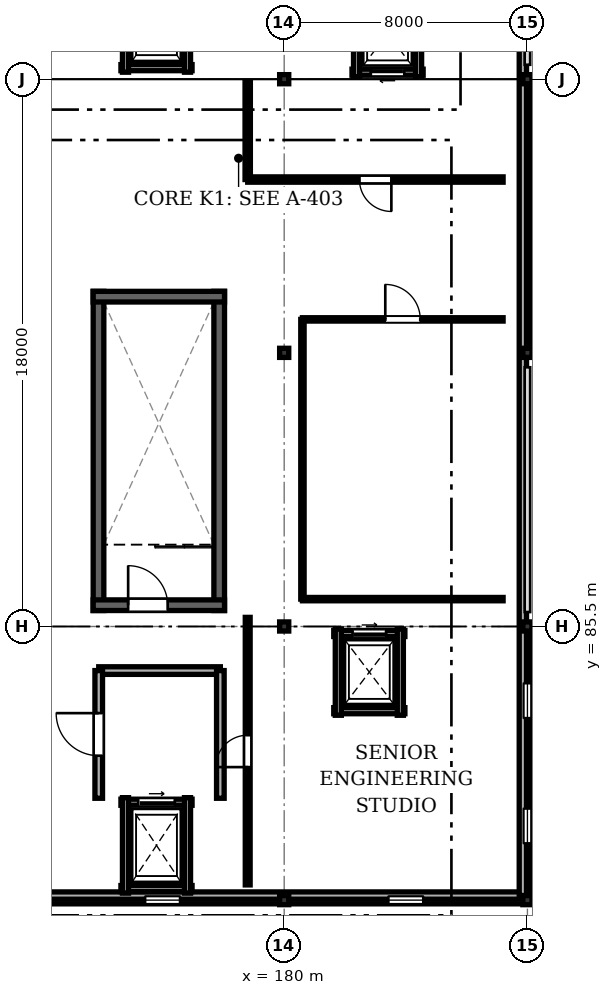
"""IFC4 building model, lengths in metres.
Left out: names, types, materials, properties, quantities, classifications, styles, units other than length and angle.
Written with IfcOpenShell. Run it as: python <this file> out.ifc"""

import sys

from ifc_helpers import new_model, si_unit, direction, frame, frame_2d, origin, origin_2d, place, context, subcontext, project, spatial, rectangle, i_section, extrude, element, fill, save


model = new_model("IFC4")
c1 = context("Model", 3, precision=1e-05, world=origin(), true_north=direction((0.0, 1.0)))
c2 = subcontext(c1, "Body", "Model", "MODEL_VIEW")
j1 = project(units=[si_unit("LENGTHUNIT", "METRE"), si_unit("PLANEANGLEUNIT", "RADIAN")], contexts=[c1])
p1 = place(None, origin())
s1 = spatial("IfcSite", under=j1, at=p1, CompositionType="ELEMENT")
p2 = place(p1, origin())
s2 = spatial("IfcBuilding", under=s1, at=p2, CompositionType="ELEMENT")
p3 = place(p2, frame((0.0, 0.0, 20.8)))
s3 = spatial("IfcBuildingStorey", under=s2, at=p3, CompositionType="ELEMENT", Elevation=20.8)
for number, where, z_axis, x_axis in (
    (1, (180.0, 76.5, 0.0), (0.0, 0.0, 1.0), (1.0, 0.0, 0.0)),
    (2, (180.0, 85.5, 0.0), (0.0, 0.0, 1.0), (1.0, 0.0, 0.0)),
    (3, (180.0, 94.5, 0.0), (0.0, 0.0, 1.0), (1.0, 0.0, 0.0)),
    (4, (180.0, 103.5, 0.0), (0.0, 0.0, 1.0), (1.0, 0.0, 0.0)),
    (5, (188.0, 76.5, 0.0), (0.0, 0.0, 1.0), (1.0, 0.0, 0.0)),
    (6, (188.0, 85.5, 0.0), (0.0, 0.0, 1.0), (1.0, 0.0, 0.0)),
    (7, (188.0, 94.5, 0.0), (0.0, 0.0, 1.0), (1.0, 0.0, 0.0)),
    (8, (188.0, 103.5, 0.0), (0.0, 0.0, 1.0), (1.0, 0.0, 0.0)),
):
    element("IfcColumn", number, at=place(p3, frame(where, z_axis=z_axis, x_axis=x_axis)), inside=s3, PredefinedType="COLUMN", context=c2, shape_type="SweptSolid", body=[
        extrude(i_section(OverallWidth=0.3, OverallDepth=0.3, WebThickness=0.01, FlangeThickness=0.015, FilletRadius=0.018, at=origin_2d()), origin(), (0.0, 0.0, 1.0), 2.85),
    ])
p4 = place(p3, frame((187.995, 76.5, 0.0), z_axis=(0.0, 0.0, 1.0), x_axis=(-1.0, 0.0, 0.0)))
e9 = element("IfcWall", 9, at=p4, inside=s3, PredefinedType="SOLIDWALL", context=c2, shape_type="SweptSolid", body=[
    extrude(rectangle(XDim=7.99, YDim=0.245, at=frame_2d((3.995, 0.0))), origin(), (0.0, 0.0, 1.0), 2.23),
])
p5 = place(p4, frame((3.42, 0.0, 0.7)))
e10 = element("IfcOpeningElement", 10, at=p5, cuts=e9, PredefinedType="OPENING", context=c2, shape_type="SweptSolid", body=[
    extrude(rectangle(XDim=1.15, YDim=1.45, at=frame_2d((0.575, 0.725))), frame((0.0, 0.133, 0.0), z_axis=(0.0, -1.0, 0.0), x_axis=(1.0, 0.0, 0.0)), (0.0, 0.0, 1.0), 0.265),
])
p6 = place(p3, frame((179.995, 76.5, 0.0), z_axis=(0.0, 0.0, 1.0), x_axis=(-1.0, 0.0, 0.0)))
e11 = element("IfcWall", 11, at=p6, inside=s3, PredefinedType="SOLIDWALL", context=c2, shape_type="SweptSolid", body=[
    extrude(rectangle(XDim=7.99, YDim=0.245, at=frame_2d((3.995, 0.0))), origin(), (0.0, 0.0, 1.0), 2.23),
])
p7 = place(p6, frame((3.42, 0.0, 0.7)))
e12 = element("IfcOpeningElement", 12, at=p7, cuts=e11, PredefinedType="OPENING", context=c2, shape_type="SweptSolid", body=[
    extrude(rectangle(XDim=1.15, YDim=1.45, at=frame_2d((0.575, 0.725))), frame((0.0, 0.133, 0.0), z_axis=(0.0, -1.0, 0.0), x_axis=(1.0, 0.0, 0.0)), (0.0, 0.0, 1.0), 0.265),
])
p8 = place(p3, frame((188.0, 85.35, 0.0), z_axis=(0.0, 0.0, 1.0), x_axis=(0.0, -1.0, 0.0)))
e13 = element("IfcWall", 13, at=p8, inside=s3, PredefinedType="SOLIDWALL", context=c2, shape_type="SweptSolid", body=[
    extrude(rectangle(XDim=8.7, YDim=0.245, at=frame_2d((4.35, 0.0))), origin(), (0.0, 0.0, 1.0), 2.23),
])
p9 = place(p8, frame((1.715, 0.0, 0.7)))
e14 = element("IfcOpeningElement", 14, at=p9, cuts=e13, PredefinedType="OPENING", context=c2, shape_type="SweptSolid", body=[
    extrude(rectangle(XDim=1.15, YDim=1.45, at=frame_2d((0.575, 0.725))), frame((0.0, 0.133, 0.0), z_axis=(0.0, -1.0, 0.0), x_axis=(1.0, 0.0, 0.0)), (0.0, 0.0, 1.0), 0.265),
])
p10 = place(p8, frame((5.835, 0.0, 0.7)))
e15 = element("IfcOpeningElement", 15, at=p10, cuts=e13, PredefinedType="OPENING", context=c2, shape_type="SweptSolid", body=[
    extrude(rectangle(XDim=1.15, YDim=1.45, at=frame_2d((0.575, 0.725))), frame((0.0, 0.133, 0.0), z_axis=(0.0, -1.0, 0.0), x_axis=(1.0, 0.0, 0.0)), (0.0, 0.0, 1.0), 0.265),
])
p11 = place(p3, frame((188.0, 103.35, 0.0), z_axis=(0.0, 0.0, 1.0), x_axis=(0.0, -1.0, 0.0)))
e16 = element("IfcWall", 16, at=p11, inside=s3, PredefinedType="SOLIDWALL", context=c2, shape_type="SweptSolid", body=[
    extrude(rectangle(XDim=8.7, YDim=0.245, at=frame_2d((4.35, 0.0))), origin(), (0.0, 0.0, 1.0), 2.18),
])
p12 = place(p3, frame((163.15, 76.65, 2.85), z_axis=(0.0, 0.0, 1.0), x_axis=(1.0, 0.0, 0.0)))
e17 = element("IfcWall", 17, at=p12, inside=s3, PredefinedType="PARAPET", context=c2, shape_type="SweptSolid", body=[
    extrude(rectangle(XDim=24.7, YDim=0.24, at=frame_2d((12.35, 0.0))), origin(), (0.0, 0.0, 1.0), 0.34),
])
p13 = place(p3, frame((187.85, 76.65, 2.85), z_axis=(0.0, 0.0, 1.0), x_axis=(0.0, 1.0, 0.0)))
e18 = element("IfcWall", 18, at=p13, inside=s3, PredefinedType="PARAPET", context=c2, shape_type="SweptSolid", body=[
    extrude(rectangle(XDim=49.2, YDim=0.24, at=frame_2d((24.6, 0.0))), origin(), (0.0, 0.0, 1.0), 0.34),
])
for number, where, z_axis, x_axis in (
    (19, (177.863, 86.025, 0.0), (0.0, 0.0, 1.0), (0.0, 1.0, 0.0)),
    (20, (173.893, 96.522, 0.0), (0.0, 0.0, 1.0), (0.0, -1.0, 0.0)),
):
    element("IfcWall", number, at=place(p3, frame(where, z_axis=z_axis, x_axis=x_axis)), inside=s3, PredefinedType="SHEAR", context=c2, shape_type="SweptSolid", body=[
        extrude(rectangle(XDim=10.498, YDim=0.35, at=frame_2d((5.249, 0.0))), origin(), (0.0, 0.0, 1.0), 2.645),
    ])
p14 = place(p3, frame((178.038, 96.347, 0.0), z_axis=(0.0, 0.0, 1.0), x_axis=(-1.0, 0.0, 0.0)))
e21 = element("IfcWall", 21, at=p14, inside=s3, PredefinedType="SHEAR", context=c2, shape_type="SweptSolid", body=[
    extrude(rectangle(XDim=4.32, YDim=0.35, at=frame_2d((2.16, 0.0))), origin(), (0.0, 0.0, 1.0), 2.645),
])
p15 = place(p3, frame((173.718, 86.2, 0.0), z_axis=(0.0, 0.0, 1.0), x_axis=(1.0, 0.0, 0.0)))
e22 = element("IfcWall", 22, at=p15, inside=s3, PredefinedType="SHEAR", context=c2, shape_type="SweptSolid", body=[
    extrude(rectangle(XDim=4.32, YDim=0.35, at=frame_2d((2.16, 0.0))), origin(), (0.0, 0.0, 1.0), 2.645),
])
p16 = place(p15, frame((1.15, 0.0, 0.0)))
e23 = element("IfcOpeningElement", 23, at=p16, cuts=e22, PredefinedType="OPENING", context=c2, shape_type="SweptSolid", body=[
    extrude(rectangle(XDim=1.3, YDim=2.1, at=frame_2d((0.65, 1.05))), frame((0.0, 0.185, 0.0), z_axis=(0.0, -1.0, 0.0), x_axis=(1.0, 0.0, 0.0)), (0.0, 0.0, 1.0), 0.37),
])
p17 = place(p3, frame((174.63, 76.88, 0.0), z_axis=(0.0, 0.0, 1.0), x_axis=(1.0, 0.0, 0.0)))
e24 = element("IfcWall", 24, at=p17, inside=s3, PredefinedType="SOLIDWALL", context=c2, shape_type="SweptSolid", body=[
    extrude(rectangle(XDim=2.34, YDim=0.2, at=frame_2d((1.17, 0.0))), origin(), (0.0, 0.0, 1.0), 2.23),
])
p18 = place(p3, frame((176.97, 79.72, 0.0), z_axis=(0.0, 0.0, 1.0), x_axis=(-1.0, 0.0, 0.0)))
e25 = element("IfcWall", 25, at=p18, inside=s3, PredefinedType="SOLIDWALL", context=c2, shape_type="SweptSolid", body=[
    extrude(rectangle(XDim=2.34, YDim=0.2, at=frame_2d((1.17, 0.0))), origin(), (0.0, 0.0, 1.0), 2.62),
])
p19 = place(p18, frame((0.57, 0.0, 0.0)))
e26 = element("IfcOpeningElement", 26, at=p19, cuts=e25, PredefinedType="OPENING", context=c2, shape_type="SweptSolid", body=[
    extrude(rectangle(XDim=1.2, YDim=2.15, at=frame_2d((0.6, 1.075))), frame((0.0, 0.11, 0.0), z_axis=(0.0, -1.0, 0.0), x_axis=(1.0, 0.0, 0.0)), (0.0, 0.0, 1.0), 0.22),
])
for number, where, z_axis, x_axis in (
    (27, (174.78, 79.87, 0.0), (0.0, 0.0, 1.0), (0.0, -1.0, 0.0)),
    (28, (176.82, 76.73, 0.0), (0.0, 0.0, 1.0), (0.0, 1.0, 0.0)),
):
    element("IfcWall", number, at=place(p3, frame(where, z_axis=z_axis, x_axis=x_axis)), inside=s3, PredefinedType="SOLIDWALL", context=c2, shape_type="SweptSolid", body=[
        extrude(rectangle(XDim=3.14, YDim=0.2, at=frame_2d((1.57, 0.0))), origin(), (0.0, 0.0, 1.0), 2.23),
    ])
p20 = place(p3, frame((174.63, 103.88, 0.0), z_axis=(0.0, 0.0, 1.0), x_axis=(1.0, 0.0, 0.0)))
e29 = element("IfcWall", 29, at=p20, inside=s3, PredefinedType="SOLIDWALL", context=c2, shape_type="SweptSolid", body=[
    extrude(rectangle(XDim=2.34, YDim=0.2, at=frame_2d((1.17, 0.0))), origin(), (0.0, 0.0, 1.0), 2.23),
])
for number, where, z_axis, x_axis in (
    (30, (174.78, 106.87, 0.0), (0.0, 0.0, 1.0), (0.0, -1.0, 0.0)),
    (31, (176.82, 103.73, 0.0), (0.0, 0.0, 1.0), (0.0, 1.0, 0.0)),
):
    element("IfcWall", number, at=place(p3, frame(where, z_axis=z_axis, x_axis=x_axis)), inside=s3, PredefinedType="SOLIDWALL", context=c2, shape_type="SweptSolid", body=[
        extrude(rectangle(XDim=3.14, YDim=0.2, at=frame_2d((1.57, 0.0))), origin(), (0.0, 0.0, 1.0), 2.23),
    ])
p21 = place(p3, frame((181.63, 82.73, 0.0), z_axis=(0.0, 0.0, 1.0), x_axis=(1.0, 0.0, 0.0)))
e32 = element("IfcWall", 32, at=p21, inside=s3, PredefinedType="SOLIDWALL", context=c2, shape_type="SweptSolid", body=[
    extrude(rectangle(XDim=2.34, YDim=0.2, at=frame_2d((1.17, 0.0))), origin(), (0.0, 0.0, 1.0), 2.62),
])
p22 = place(p3, frame((183.97, 85.27, 0.0), z_axis=(0.0, 0.0, 1.0), x_axis=(-1.0, 0.0, 0.0)))
e33 = element("IfcWall", 33, at=p22, inside=s3, PredefinedType="SOLIDWALL", context=c2, shape_type="SweptSolid", body=[
    extrude(rectangle(XDim=2.34, YDim=0.2, at=frame_2d((1.17, 0.0))), origin(), (0.0, 0.0, 1.0), 2.23),
])
p23 = place(p22, frame((0.62, 0.0, 0.0)))
e34 = element("IfcOpeningElement", 34, at=p23, cuts=e33, PredefinedType="OPENING", context=c2, shape_type="SweptSolid", body=[
    extrude(rectangle(XDim=1.1, YDim=2.15, at=frame_2d((0.55, 1.075))), frame((0.0, 0.11, 0.0), z_axis=(0.0, -1.0, 0.0), x_axis=(1.0, 0.0, 0.0)), (0.0, 0.0, 1.0), 0.22),
])
for number, where, z_axis, x_axis in (
    (35, (181.78, 85.42, 0.0), (0.0, 0.0, 1.0), (0.0, -1.0, 0.0)),
    (36, (183.82, 82.58, 0.0), (0.0, 0.0, 1.0), (0.0, 1.0, 0.0)),
):
    element("IfcWall", number, at=place(p3, frame(where, z_axis=z_axis, x_axis=x_axis)), inside=s3, PredefinedType="SOLIDWALL", context=c2, shape_type="SweptSolid", body=[
        extrude(rectangle(XDim=2.84, YDim=0.2, at=frame_2d((1.42, 0.0))), origin(), (0.0, 0.0, 1.0), 2.23),
    ])
p24 = place(p3, frame((182.23, 103.73, 0.0), z_axis=(0.0, 0.0, 1.0), x_axis=(1.0, 0.0, 0.0)))
e37 = element("IfcWall", 37, at=p24, inside=s3, PredefinedType="SOLIDWALL", context=c2, shape_type="SweptSolid", body=[
    extrude(rectangle(XDim=2.34, YDim=0.2, at=frame_2d((1.17, 0.0))), origin(), (0.0, 0.0, 1.0), 2.23),
])
p25 = place(p24, frame((0.62, 0.0, 0.0)))
e38 = element("IfcOpeningElement", 38, at=p25, cuts=e37, PredefinedType="OPENING", context=c2, shape_type="SweptSolid", body=[
    extrude(rectangle(XDim=1.1, YDim=2.15, at=frame_2d((0.55, 1.075))), frame((0.0, 0.11, 0.0), z_axis=(0.0, -1.0, 0.0), x_axis=(1.0, 0.0, 0.0)), (0.0, 0.0, 1.0), 0.22),
])
for number, where, z_axis, x_axis in (
    (39, (182.38, 106.42, 0.0), (0.0, 0.0, 1.0), (0.0, -1.0, 0.0)),
    (40, (184.42, 103.58, 0.0), (0.0, 0.0, 1.0), (0.0, 1.0, 0.0)),
):
    element("IfcWall", number, at=place(p3, frame(where, z_axis=z_axis, x_axis=x_axis)), inside=s3, PredefinedType="SOLIDWALL", context=c2, shape_type="SweptSolid", body=[
        extrude(rectangle(XDim=2.84, YDim=0.2, at=frame_2d((1.42, 0.0))), origin(), (0.0, 0.0, 1.0), 2.23),
    ])
p26 = place(p3, frame((187.2, 100.2, 0.0), z_axis=(0.0, 0.0, 1.0), x_axis=(-1.0, 0.0, 0.0)))
e41 = element("IfcWall", 41, at=p26, inside=s3, PredefinedType="PARTITIONING", context=c2, shape_type="SweptSolid", body=[
    extrude(rectangle(XDim=8.4, YDim=0.175, at=frame_2d((4.2, 0.0))), origin(), (0.0, 0.0, 1.0), 2.23),
])
p27 = place(p26, frame((3.675, 0.0, 0.0)))
e42 = element("IfcOpeningElement", 42, at=p27, cuts=e41, PredefinedType="OPENING", context=c2, shape_type="SweptSolid", body=[
    extrude(rectangle(XDim=1.05, YDim=2.1, at=frame_2d((0.525, 1.05))), frame((0.0, 0.097, 0.0), z_axis=(0.0, -1.0, 0.0), x_axis=(1.0, 0.0, 0.0)), (0.0, 0.0, 1.0), 0.195),
])
p28 = place(p3, frame((178.8, 100.2, 0.0), z_axis=(0.0, 0.0, 1.0), x_axis=(0.0, 1.0, 0.0)))
e43 = element("IfcWall", 43, at=p28, inside=s3, PredefinedType="PARTITIONING", context=c2, shape_type="SweptSolid", body=[
    extrude(rectangle(XDim=3.2, YDim=0.175, at=frame_2d((1.6, 0.0))), origin(), (0.0, 0.0, 1.0), 2.23),
])
p29 = place(p3, frame((187.2, 86.4, 0.0), z_axis=(0.0, 0.0, 1.0), x_axis=(-1.0, 0.0, 0.0)))
e44 = element("IfcWall", 44, at=p29, inside=s3, PredefinedType="PARTITIONING", context=c2, shape_type="SweptSolid", body=[
    extrude(rectangle(XDim=6.6, YDim=0.11, at=frame_2d((3.3, 0.0))), origin(), (0.0, 0.0, 1.0), 2.23),
])
p30 = place(p3, frame((180.6, 95.6, 0.0), z_axis=(0.0, 0.0, 1.0), x_axis=(1.0, 0.0, 0.0)))
e45 = element("IfcWall", 45, at=p30, inside=s3, PredefinedType="PARTITIONING", context=c2, shape_type="SweptSolid", body=[
    extrude(rectangle(XDim=6.6, YDim=0.11, at=frame_2d((3.3, 0.0))), origin(), (0.0, 0.0, 1.0), 2.23),
])
p31 = place(p30, frame((2.725, 0.0, 0.0)))
e46 = element("IfcOpeningElement", 46, at=p31, cuts=e45, PredefinedType="OPENING", context=c2, shape_type="SweptSolid", body=[
    extrude(rectangle(XDim=1.15, YDim=2.1, at=frame_2d((0.575, 1.05))), frame((0.0, 0.065, 0.0), z_axis=(0.0, -1.0, 0.0), x_axis=(1.0, 0.0, 0.0)), (0.0, 0.0, 1.0), 0.13),
])
p32 = place(p3, frame((180.6, 86.4, 0.0), z_axis=(0.0, 0.0, 1.0), x_axis=(0.0, 1.0, 0.0)))
e47 = element("IfcWall", 47, at=p32, inside=s3, PredefinedType="PARTITIONING", context=c2, shape_type="SweptSolid", body=[
    extrude(rectangle(XDim=9.2, YDim=0.11, at=frame_2d((4.6, 0.0))), origin(), (0.0, 0.0, 1.0), 2.23),
])
p33 = place(p3, frame((178.8, 77.0, 0.0), z_axis=(0.0, 0.0, 1.0), x_axis=(0.0, 1.0, 0.0)))
e48 = element("IfcWall", 48, at=p33, inside=s3, PredefinedType="PARTITIONING", context=c2, shape_type="SweptSolid", body=[
    extrude(rectangle(XDim=8.8, YDim=0.16, at=frame_2d((4.4, 0.0))), origin(), (0.0, 0.0, 1.0), 2.23),
])
p34 = place(p33, frame((3.875, 0.0, 0.0)))
e49 = element("IfcOpeningElement", 49, at=p34, cuts=e48, PredefinedType="OPENING", context=c2, shape_type="SweptSolid", body=[
    extrude(rectangle(XDim=1.05, YDim=2.1, at=frame_2d((0.525, 1.05))), frame((0.0, 0.09, 0.0), z_axis=(0.0, -1.0, 0.0), x_axis=(1.0, 0.0, 0.0)), (0.0, 0.0, 1.0), 0.18),
])
p35 = place(p3, frame((173.9, 84.05, 0.0), z_axis=(0.0, 0.0, 1.0), x_axis=(1.0, 0.0, 0.0)))
e50 = element("IfcWall", 50, at=p35, inside=s3, PredefinedType="SOLIDWALL", context=c2, shape_type="SweptSolid", body=[
    extrude(rectangle(XDim=4.0, YDim=0.25, at=frame_2d((2.0, 0.0))), origin(), (0.0, 0.0, 1.0), 2.62),
])
p36 = place(p3, frame((173.9, 79.85, 0.0), z_axis=(0.0, 0.0, 1.0), x_axis=(0.0, 1.0, 0.0)))
e51 = element("IfcWall", 51, at=p36, inside=s3, PredefinedType="SOLIDWALL", context=c2, shape_type="SweptSolid", body=[
    extrude(rectangle(XDim=4.2, YDim=0.25, at=frame_2d((2.1, 0.0))), origin(), (0.0, 0.0, 1.0), 2.62),
])
p37 = place(p36, frame((1.4, 0.0, 0.0)))
e52 = element("IfcOpeningElement", 52, at=p37, cuts=e51, PredefinedType="OPENING", context=c2, shape_type="SweptSolid", body=[
    extrude(rectangle(XDim=1.4, YDim=2.1, at=frame_2d((0.7, 1.05))), frame((0.0, 0.135, 0.0), z_axis=(0.0, -1.0, 0.0), x_axis=(1.0, 0.0, 0.0)), (0.0, 0.0, 1.0), 0.27),
])
p38 = place(p3, frame((177.9, 84.05, 0.0), z_axis=(0.0, 0.0, 1.0), x_axis=(0.0, -1.0, 0.0)))
e53 = element("IfcWall", 53, at=p38, inside=s3, PredefinedType="SOLIDWALL", context=c2, shape_type="SweptSolid", body=[
    extrude(rectangle(XDim=4.2, YDim=0.25, at=frame_2d((2.1, 0.0))), origin(), (0.0, 0.0, 1.0), 2.62),
])
p39 = place(p5, origin())
e54 = element("IfcWindow", 54, at=p39, inside=s3, PartitioningType="SINGLE_PANEL", PredefinedType="WINDOW", context=c2, shape_type="SweptSolid", body=[
    extrude(rectangle(XDim=1.15, YDim=1.45, at=frame_2d((0.575, 0.725))), frame((0.0, 0.03, 0.0), z_axis=(0.0, -1.0, 0.0), x_axis=(1.0, 0.0, 0.0)), (0.0, 0.0, 1.0), 0.06),
])
fill(e10, e54)
p40 = place(p7, origin())
e55 = element("IfcWindow", 55, at=p40, inside=s3, PartitioningType="SINGLE_PANEL", PredefinedType="WINDOW", context=c2, shape_type="SweptSolid", body=[
    extrude(rectangle(XDim=1.15, YDim=1.45, at=frame_2d((0.575, 0.725))), frame((0.0, 0.03, 0.0), z_axis=(0.0, -1.0, 0.0), x_axis=(1.0, 0.0, 0.0)), (0.0, 0.0, 1.0), 0.06),
])
fill(e12, e55)
p41 = place(p9, origin())
e56 = element("IfcWindow", 56, at=p41, inside=s3, PartitioningType="SINGLE_PANEL", PredefinedType="WINDOW", context=c2, shape_type="SweptSolid", body=[
    extrude(rectangle(XDim=1.15, YDim=1.45, at=frame_2d((0.575, 0.725))), frame((0.0, 0.03, 0.0), z_axis=(0.0, -1.0, 0.0), x_axis=(1.0, 0.0, 0.0)), (0.0, 0.0, 1.0), 0.06),
])
fill(e14, e56)
p42 = place(p10, origin())
e57 = element("IfcWindow", 57, at=p42, inside=s3, PartitioningType="SINGLE_PANEL", PredefinedType="WINDOW", context=c2, shape_type="SweptSolid", body=[
    extrude(rectangle(XDim=1.15, YDim=1.45, at=frame_2d((0.575, 0.725))), frame((0.0, 0.03, 0.0), z_axis=(0.0, -1.0, 0.0), x_axis=(1.0, 0.0, 0.0)), (0.0, 0.0, 1.0), 0.06),
])
fill(e15, e57)
p43 = place(p16, origin())
e58 = element("IfcDoor", 58, at=p43, inside=s3, OperationType="SINGLE_SWING_LEFT", PredefinedType="DOOR", context=c2, shape_type="SweptSolid", body=[
    extrude(rectangle(XDim=1.3, YDim=2.1, at=frame_2d((0.65, 1.05))), frame((0.0, 0.025, 0.0), z_axis=(0.0, -1.0, 0.0), x_axis=(1.0, 0.0, 0.0)), (0.0, 0.0, 1.0), 0.05),
])
fill(e23, e58)
p44 = place(p19, origin())
e59 = element("IfcDoor", 59, at=p44, inside=s3, OperationType="SLIDING_TO_LEFT", PredefinedType="DOOR", context=c2, shape_type="SweptSolid", body=[
    extrude(rectangle(XDim=1.2, YDim=2.15, at=frame_2d((0.6, 1.075))), frame((0.0, 0.025, 0.0), z_axis=(0.0, -1.0, 0.0), x_axis=(1.0, 0.0, 0.0)), (0.0, 0.0, 1.0), 0.05),
])
fill(e26, e59)
p45 = place(p23, origin())
e60 = element("IfcDoor", 60, at=p45, inside=s3, OperationType="SLIDING_TO_LEFT", PredefinedType="DOOR", context=c2, shape_type="SweptSolid", body=[
    extrude(rectangle(XDim=1.1, YDim=2.15, at=frame_2d((0.55, 1.075))), frame((0.0, 0.025, 0.0), z_axis=(0.0, -1.0, 0.0), x_axis=(1.0, 0.0, 0.0)), (0.0, 0.0, 1.0), 0.05),
])
fill(e34, e60)
p46 = place(p25, origin())
e61 = element("IfcDoor", 61, at=p46, inside=s3, OperationType="SLIDING_TO_LEFT", PredefinedType="DOOR", context=c2, shape_type="SweptSolid", body=[
    extrude(rectangle(XDim=1.1, YDim=2.15, at=frame_2d((0.55, 1.075))), frame((0.0, 0.025, 0.0), z_axis=(0.0, -1.0, 0.0), x_axis=(1.0, 0.0, 0.0)), (0.0, 0.0, 1.0), 0.05),
])
fill(e38, e61)
p47 = place(p27, origin())
e62 = element("IfcDoor", 62, at=p47, inside=s3, OperationType="SINGLE_SWING_LEFT", PredefinedType="DOOR", context=c2, shape_type="SweptSolid", body=[
    extrude(rectangle(XDim=1.05, YDim=2.1, at=frame_2d((0.525, 1.05))), frame((0.0, 0.025, 0.0), z_axis=(0.0, -1.0, 0.0), x_axis=(1.0, 0.0, 0.0)), (0.0, 0.0, 1.0), 0.05),
])
fill(e42, e62)
p48 = place(p31, origin())
e63 = element("IfcDoor", 63, at=p48, inside=s3, OperationType="SINGLE_SWING_LEFT", PredefinedType="DOOR", context=c2, shape_type="SweptSolid", body=[
    extrude(rectangle(XDim=1.15, YDim=2.1, at=frame_2d((0.575, 1.05))), frame((0.0, 0.025, 0.0), z_axis=(0.0, -1.0, 0.0), x_axis=(1.0, 0.0, 0.0)), (0.0, 0.0, 1.0), 0.05),
])
fill(e46, e63)
p49 = place(p34, origin())
e64 = element("IfcDoor", 64, at=p49, inside=s3, OperationType="SINGLE_SWING_LEFT", PredefinedType="DOOR", context=c2, shape_type="SweptSolid", body=[
    extrude(rectangle(XDim=1.05, YDim=2.1, at=frame_2d((0.525, 1.05))), frame((0.0, 0.025, 0.0), z_axis=(0.0, -1.0, 0.0), x_axis=(1.0, 0.0, 0.0)), (0.0, 0.0, 1.0), 0.05),
])
fill(e49, e64)
p50 = place(p37, origin())
e65 = element("IfcDoor", 65, at=p50, inside=s3, OperationType="SINGLE_SWING_RIGHT", PredefinedType="DOOR", context=c2, shape_type="SweptSolid", body=[
    extrude(rectangle(XDim=1.4, YDim=2.1, at=frame_2d((0.7, 1.05))), frame((0.0, 0.025, 0.0), z_axis=(0.0, -1.0, 0.0), x_axis=(1.0, 0.0, 0.0)), (0.0, 0.0, 1.0), 0.05),
])
fill(e52, e65)
save(model, sys.argv[1])
